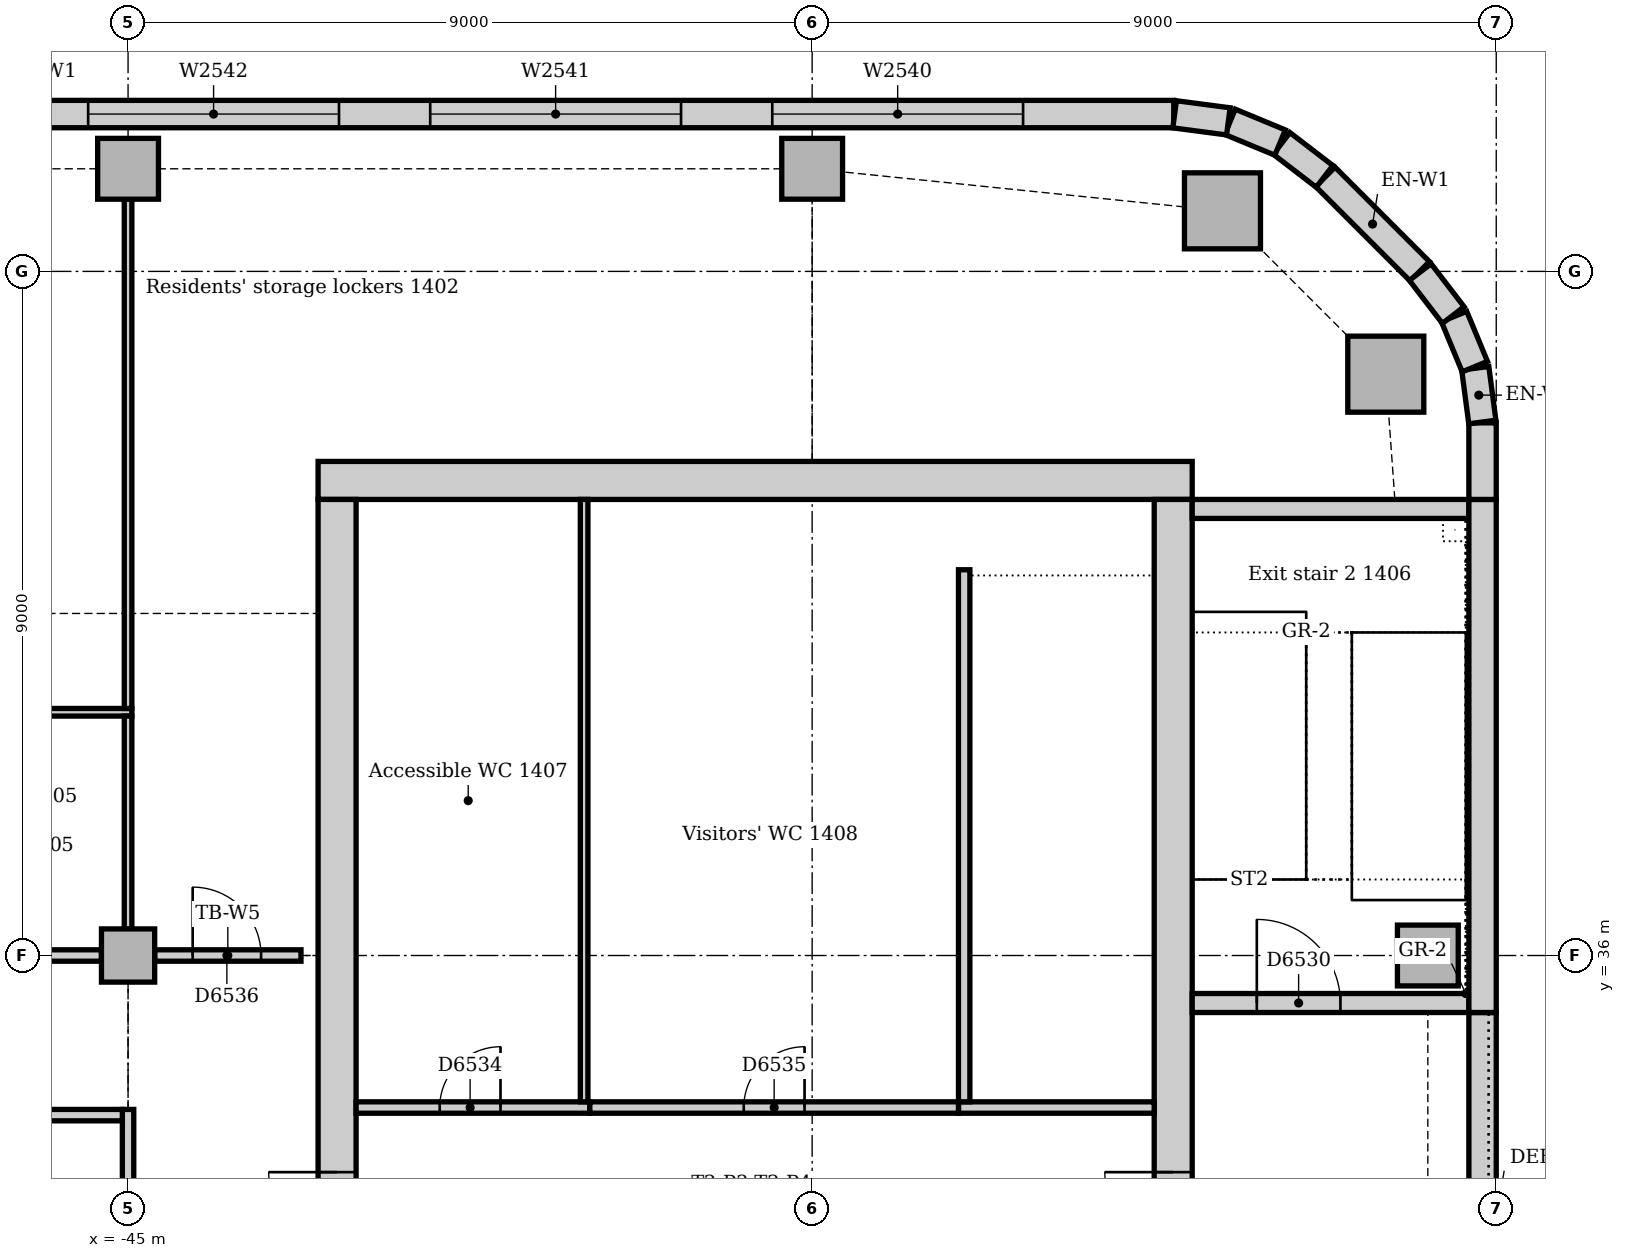
"""IFC4 building model, lengths in metres.
Left out: names, types, materials, properties, quantities, classifications, styles, units other than length and angle.
Written with IfcOpenShell. Run it as: python <this file> out.ifc"""

import sys

from ifc_helpers import new_model, si_unit, direction, frame, frame_2d, origin, origin_2d, place, context, subcontext, project, spatial, rectangle, extrude, element, fill, save


model = new_model("IFC4")
c1 = context("Model", 3, precision=1e-05, world=origin(), true_north=direction((0.0, 1.0)))
c2 = subcontext(c1, "Body", "Model", "MODEL_VIEW")
j1 = project(units=[si_unit("LENGTHUNIT", "METRE"), si_unit("PLANEANGLEUNIT", "RADIAN")], contexts=[c1])
p1 = place(None, origin())
s1 = spatial("IfcSite", under=j1, at=p1, CompositionType="ELEMENT")
p2 = place(p1, origin())
s2 = spatial("IfcBuilding", under=s1, at=p2, CompositionType="ELEMENT")
p3 = place(p2, frame((0.0, 0.0, 63.0)))
s3 = spatial("IfcBuildingStorey", under=s2, at=p3, CompositionType="ELEMENT", Elevation=63.0)
p4 = place(p3, frame((-31.0, 42.25, 0.0), z_axis=(0.0, 0.0, 1.0), x_axis=(-1.0, 0.0, 0.0)))
e1 = element("IfcWall", 1, at=p4, inside=s3, PredefinedType="SOLIDWALL", context=c2, shape_type="SweptSolid", body=[
    extrude(rectangle(XDim=11.5, YDim=0.5, at=frame_2d((5.75, 0.0))), origin(), (0.0, 0.0, 1.0), 4.0),
])
p5 = place(p3, frame((-31.25, 30.5, 0.0), z_axis=(0.0, 0.0, 1.0), x_axis=(0.0, 1.0, 0.0)))
e2 = element("IfcWall", 2, at=p5, inside=s3, PredefinedType="SOLIDWALL", context=c2, shape_type="SweptSolid", body=[
    extrude(rectangle(XDim=11.5, YDim=0.5, at=frame_2d((5.75, 0.0))), origin(), (0.0, 0.0, 1.0), 4.0),
])
p6 = place(p5, frame((0.85, 0.0, 0.0)))
e3 = element("IfcOpeningElement", 3, at=p6, cuts=e2, PredefinedType="OPENING", context=c2, shape_type="SweptSolid", body=[
    extrude(rectangle(XDim=1.8, YDim=2.1, at=frame_2d((0.9, 1.05))), frame((0.0, 0.26, 0.0), z_axis=(0.0, -1.0, 0.0), x_axis=(1.0, 0.0, 0.0)), (0.0, 0.0, 1.0), 0.52),
])
p7 = place(p3, frame((-42.25, 42.0, 0.0), z_axis=(0.0, 0.0, 1.0), x_axis=(0.0, -1.0, 0.0)))
e4 = element("IfcWall", 4, at=p7, inside=s3, PredefinedType="SOLIDWALL", context=c2, shape_type="SweptSolid", body=[
    extrude(rectangle(XDim=11.5, YDim=0.5, at=frame_2d((5.75, 0.0))), origin(), (0.0, 0.0, 1.0), 4.0),
])
p8 = place(p7, frame((8.85, 0.0, 0.0)))
e5 = element("IfcOpeningElement", 5, at=p8, cuts=e4, PredefinedType="OPENING", context=c2, shape_type="SweptSolid", body=[
    extrude(rectangle(XDim=1.8, YDim=2.1, at=frame_2d((0.9, 1.05))), frame((0.0, 0.26, 0.0), z_axis=(0.0, -1.0, 0.0), x_axis=(1.0, 0.0, 0.0)), (0.0, 0.0, 1.0), 0.52),
])
p9 = place(p3, frame((-31.0, 35.375, 0.0), z_axis=(0.0, 0.0, 1.0), x_axis=(1.0, 0.0, 0.0)))
e6 = element("IfcWall", 6, at=p9, inside=s3, PredefinedType="SOLIDWALL", context=c2, shape_type="SweptSolid", body=[
    extrude(rectangle(XDim=3.64, YDim=0.25, at=frame_2d((1.82, 0.0))), origin(), (0.0, 0.0, 1.0), 4.0),
])
p10 = place(p9, frame((0.85, 0.0, 0.0)))
e7 = element("IfcOpeningElement", 7, at=p10, cuts=e6, PredefinedType="OPENING", context=c2, shape_type="SweptSolid", body=[
    extrude(rectangle(XDim=1.1, YDim=2.1, at=frame_2d((0.55, 1.05))), frame((0.0, 0.135, 0.0), z_axis=(0.0, -1.0, 0.0), x_axis=(1.0, 0.0, 0.0)), (0.0, 0.0, 1.0), 0.27),
])
p11 = place(p3, frame((-27.36, 41.875, 0.0), z_axis=(0.0, 0.0, 1.0), x_axis=(-1.0, 0.0, 0.0)))
e8 = element("IfcWall", 8, at=p11, inside=s3, PredefinedType="SOLIDWALL", context=c2, shape_type="SweptSolid", body=[
    extrude(rectangle(XDim=3.64, YDim=0.25, at=frame_2d((1.82, 0.0))), origin(), (0.0, 0.0, 1.0), 4.0),
])
for number, where, z_axis, x_axis in (
    (9, (-28.453, 43.648, 0.0), (0.0, 0.0, 1.0), (1.0, 0.0, 0.0)),
    (10, (-30.602, 45.797, 0.0), (0.0, 0.0, 1.0), (1.0, 0.0, 0.0)),
):
    element("IfcColumn", number, at=place(p3, frame(where, z_axis=z_axis, x_axis=x_axis)), inside=s3, PredefinedType="COLUMN", context=c2, shape_type="SweptSolid", body=[
        extrude(rectangle(XDim=1.0, YDim=1.0, at=origin_2d()), origin(), (0.0, 0.0, 1.0), 3.85),
    ])
p12 = place(p3, frame((-27.9, 36.0, 0.0), z_axis=(0.0, 0.0, 1.0), x_axis=(1.0, 0.0, 0.0)))
e11 = element("IfcColumn", 11, at=p12, inside=s3, PredefinedType="COLUMN", context=c2, shape_type="SweptSolid", body=[
    extrude(rectangle(XDim=0.8, YDim=0.8, at=origin_2d()), origin(), (0.0, 0.0, 1.0), 4.0),
])
for number, where, z_axis, x_axis in (
    (12, (-45.0, 46.35, 0.0), (0.0, 0.0, 1.0), (1.0, 0.0, 0.0)),
    (13, (-36.0, 46.35, 0.0), (0.0, 0.0, 1.0), (1.0, 0.0, 0.0)),
):
    element("IfcColumn", number, at=place(p3, frame(where, z_axis=z_axis, x_axis=x_axis)), inside=s3, PredefinedType="COLUMN", context=c2, shape_type="SweptSolid", body=[
        extrude(rectangle(XDim=0.8, YDim=0.8, at=origin_2d()), origin(), (0.0, 0.0, 1.0), 3.85),
    ])
p13 = place(p3, frame((-45.0, 36.0, 0.0), z_axis=(0.0, 0.0, 1.0), x_axis=(1.0, 0.0, 0.0)))
e14 = element("IfcColumn", 14, at=p13, inside=s3, PredefinedType="COLUMN", context=c2, shape_type="SweptSolid", body=[
    extrude(rectangle(XDim=0.7, YDim=0.7, at=origin_2d()), origin(), (0.0, 0.0, 1.0), 3.85),
])
p14 = place(p3, frame((-27.18, 27.75, 0.0), z_axis=(0.0, 0.0, 1.0), x_axis=(0.0, 1.0, 0.0)))
e15 = element("IfcWall", 15, at=p14, inside=s3, PredefinedType="STANDARD", context=c2, shape_type="SweptSolid", body=[
    extrude(rectangle(XDim=7.5, YDim=0.36, at=frame_2d((3.75, 0.0))), origin(), (0.0, 0.0, 1.0), 3.85),
])
p15 = place(p14, frame((2.85, 0.0, 1.2)))
e16 = element("IfcOpeningElement", 16, at=p15, cuts=e15, PredefinedType="OPENING", context=c2, shape_type="SweptSolid", body=[
    extrude(rectangle(XDim=1.8, YDim=1.2, at=frame_2d((0.9, 0.6))), frame((0.0, 0.19, 0.0), z_axis=(0.0, -1.0, 0.0), x_axis=(1.0, 0.0, 0.0)), (0.0, 0.0, 1.0), 0.38),
])
p16 = place(p3, frame((-27.18, 35.25, 0.0), z_axis=(0.0, 0.0, 1.0), x_axis=(0.0, 1.0, 0.0)))
e17 = element("IfcWall", 17, at=p16, inside=s3, PredefinedType="STANDARD", context=c2, shape_type="SweptSolid", body=[
    extrude(rectangle(XDim=6.75, YDim=0.36, at=frame_2d((3.375, 0.0))), origin(), (0.0, 0.0, 1.0), 3.85),
])
p17 = place(p3, frame((-27.18, 42.0, 0.0), z_axis=(0.0, 0.0, 1.0), x_axis=(0.0, 1.0, 0.0)))
e18 = element("IfcWall", 18, at=p17, inside=s3, PredefinedType="STANDARD", context=c2, shape_type="SweptSolid", body=[
    extrude(rectangle(XDim=1.007, YDim=0.36, at=frame_2d((0.504, 0.0))), origin(), (0.0, 0.0, 1.0), 3.85),
])
p18 = place(p3, frame((-28.006, 45.001, 0.0), z_axis=(0.0, 0.0, 1.0), x_axis=(-0.707106781187, 0.707106781187, 0.0)))
e19 = element("IfcWall", 19, at=p18, inside=s3, PredefinedType="STANDARD", context=c2, shape_type="SweptSolid", body=[
    extrude(rectangle(XDim=1.757, YDim=0.36, at=frame_2d((0.879, 0.0))), origin(), (0.0, 0.0, 1.0), 3.85),
])
p19 = place(p3, frame((-31.243, 47.07, 0.0), z_axis=(0.0, 0.0, 1.0), x_axis=(-1.0, 0.0, 0.0)))
e20 = element("IfcWall", 20, at=p19, inside=s3, PredefinedType="STANDARD", context=c2, shape_type="SweptSolid", body=[
    extrude(rectangle(XDim=29.765, YDim=0.36, at=frame_2d((14.882, 0.0))), origin(), (0.0, 0.0, 1.0), 3.85),
])
p20 = place(p19, frame((1.982, 0.0, 0.9)))
e21 = element("IfcOpeningElement", 21, at=p20, cuts=e20, PredefinedType="OPENING", context=c2, shape_type="SweptSolid", body=[
    extrude(rectangle(XDim=3.3, YDim=1.6, at=frame_2d((1.65, 0.8))), frame((0.0, 0.19, 0.0), z_axis=(0.0, -1.0, 0.0), x_axis=(1.0, 0.0, 0.0)), (0.0, 0.0, 1.0), 0.38),
])
p21 = place(p19, frame((6.482, 0.0, 0.9)))
e22 = element("IfcOpeningElement", 22, at=p21, cuts=e20, PredefinedType="OPENING", context=c2, shape_type="SweptSolid", body=[
    extrude(rectangle(XDim=3.3, YDim=1.6, at=frame_2d((1.65, 0.8))), frame((0.0, 0.19, 0.0), z_axis=(0.0, -1.0, 0.0), x_axis=(1.0, 0.0, 0.0)), (0.0, 0.0, 1.0), 0.38),
])
p22 = place(p19, frame((10.982, 0.0, 0.9)))
e23 = element("IfcOpeningElement", 23, at=p22, cuts=e20, PredefinedType="OPENING", context=c2, shape_type="SweptSolid", body=[
    extrude(rectangle(XDim=3.3, YDim=1.6, at=frame_2d((1.65, 0.8))), frame((0.0, 0.19, 0.0), z_axis=(0.0, -1.0, 0.0), x_axis=(1.0, 0.0, 0.0)), (0.0, 0.0, 1.0), 0.38),
])
p23 = place(p19, frame((15.482, 0.0, 0.9)))
e24 = element("IfcOpeningElement", 24, at=p23, cuts=e20, PredefinedType="OPENING", context=c2, shape_type="SweptSolid", body=[
    extrude(rectangle(XDim=3.3, YDim=1.6, at=frame_2d((1.65, 0.8))), frame((0.0, 0.19, 0.0), z_axis=(0.0, -1.0, 0.0), x_axis=(1.0, 0.0, 0.0)), (0.0, 0.0, 1.0), 0.38),
])
p24 = place(p19, frame((19.982, 0.0, 0.9)))
e25 = element("IfcOpeningElement", 25, at=p24, cuts=e20, PredefinedType="OPENING", context=c2, shape_type="SweptSolid", body=[
    extrude(rectangle(XDim=3.3, YDim=1.6, at=frame_2d((1.65, 0.8))), frame((0.0, 0.19, 0.0), z_axis=(0.0, -1.0, 0.0), x_axis=(1.0, 0.0, 0.0)), (0.0, 0.0, 1.0), 0.38),
])
p25 = place(p19, frame((24.482, 0.0, 0.9)))
e26 = element("IfcOpeningElement", 26, at=p25, cuts=e20, PredefinedType="OPENING", context=c2, shape_type="SweptSolid", body=[
    extrude(rectangle(XDim=3.3, YDim=1.6, at=frame_2d((1.65, 0.8))), frame((0.0, 0.19, 0.0), z_axis=(0.0, -1.0, 0.0), x_axis=(1.0, 0.0, 0.0)), (0.0, 0.0, 1.0), 0.38),
])
for number, where, z_axis, x_axis in (
    (27, (-27.183, 43.019, 0.0), (0.0, 0.0, 1.0), (-0.131, 0.991, 0.0)),
    (28, (-27.282, 43.747, 0.0), (0.0, 0.0, 1.0), (-0.383, 0.924, 0.0)),
):
    element("IfcWall", number, at=place(p3, frame(where, z_axis=z_axis, x_axis=x_axis)), inside=s3, PredefinedType="STANDARD", context=c2, shape_type="SweptSolid", body=[
        extrude(rectangle(XDim=0.713, YDim=0.36, at=frame_2d((0.356, 0.0))), origin(), (0.0, 0.0, 1.0), 3.85),
    ])
for number, where, z_axis, x_axis in (
    (29, (-27.566, 44.425, 0.0), (0.0, 0.0, 1.0), (-0.609, 0.793, 0.0)),
    (30, (-29.259, 46.25, 0.0), (0.0, 0.0, 1.0), (-0.793, 0.609, 0.0)),
):
    element("IfcWall", number, at=place(p3, frame(where, z_axis=z_axis, x_axis=x_axis)), inside=s3, PredefinedType="STANDARD", context=c2, shape_type="SweptSolid", body=[
        extrude(rectangle(XDim=0.713, YDim=0.36, at=frame_2d((0.357, 0.0))), origin(), (0.0, 0.0, 1.0), 3.85),
    ])
for number, where, z_axis, x_axis in (
    (31, (-29.844, 46.695, 0.0), (0.0, 0.0, 1.0), (-0.924, 0.383, 0.0)),
    (32, (-30.524, 46.974, 0.0), (0.0, 0.0, 1.0), (-0.991, 0.131, 0.0)),
):
    element("IfcWall", number, at=place(p3, frame(where, z_axis=z_axis, x_axis=x_axis)), inside=s3, PredefinedType="STANDARD", context=c2, shape_type="SweptSolid", body=[
        extrude(rectangle(XDim=0.713, YDim=0.36, at=frame_2d((0.356, 0.0))), origin(), (0.0, 0.0, 1.0), 3.85),
    ])
p26 = place(p3, frame((-34.075, 34.0, 0.0), z_axis=(0.0, 0.0, 1.0), x_axis=(1.0, 0.0, 0.0)))
e33 = element("IfcWall", 33, at=p26, inside=s3, PredefinedType="SOLIDWALL", context=c2, shape_type="SweptSolid", body=[
    extrude(rectangle(XDim=2.575, YDim=0.15, at=frame_2d((1.288, 0.0))), origin(), (0.0, 0.0, 1.0), 4.0),
])
p27 = place(p3, frame((-34.0, 41.075, 0.0), z_axis=(0.0, 0.0, 1.0), x_axis=(0.0, -1.0, 0.0)))
e34 = element("IfcWall", 34, at=p27, inside=s3, PredefinedType="SOLIDWALL", context=c2, shape_type="SweptSolid", body=[
    extrude(rectangle(XDim=7.0, YDim=0.15, at=frame_2d((3.5, 0.0))), origin(), (0.0, 0.0, 1.0), 4.0),
])
p28 = place(p3, frame((-38.925, 34.0, 0.0), z_axis=(0.0, 0.0, 1.0), x_axis=(-1.0, 0.0, 0.0)))
e35 = element("IfcWall", 35, at=p28, inside=s3, PredefinedType="PARTITIONING", context=c2, shape_type="SweptSolid", body=[
    extrude(rectangle(XDim=3.075, YDim=0.15, at=frame_2d((1.538, 0.0))), origin(), (0.0, 0.0, 1.0), 3.85),
])
p29 = place(p28, frame((1.175, 0.0, 0.0)))
e36 = element("IfcOpeningElement", 36, at=p29, cuts=e35, PredefinedType="OPENING", context=c2, shape_type="SweptSolid", body=[
    extrude(rectangle(XDim=0.8, YDim=2.1, at=frame_2d((0.4, 1.05))), frame((0.0, 0.085, 0.0), z_axis=(0.0, -1.0, 0.0), x_axis=(1.0, 0.0, 0.0)), (0.0, 0.0, 1.0), 0.17),
])
p30 = place(p3, frame((-34.075, 34.0, 0.0), z_axis=(0.0, 0.0, 1.0), x_axis=(-1.0, 0.0, 0.0)))
e37 = element("IfcWall", 37, at=p30, inside=s3, PredefinedType="PARTITIONING", context=c2, shape_type="SweptSolid", body=[
    extrude(rectangle(XDim=4.85, YDim=0.15, at=frame_2d((2.425, 0.0))), origin(), (0.0, 0.0, 1.0), 3.85),
])
p31 = place(p30, frame((2.025, 0.0, 0.0)))
e38 = element("IfcOpeningElement", 38, at=p31, cuts=e37, PredefinedType="OPENING", context=c2, shape_type="SweptSolid", body=[
    extrude(rectangle(XDim=0.8, YDim=2.1, at=frame_2d((0.4, 1.05))), frame((0.0, 0.085, 0.0), z_axis=(0.0, -1.0, 0.0), x_axis=(1.0, 0.0, 0.0)), (0.0, 0.0, 1.0), 0.17),
])
p32 = place(p3, frame((-39.0, 34.075, 0.0), z_axis=(0.0, 0.0, 1.0), x_axis=(0.0, 1.0, 0.0)))
e39 = element("IfcWall", 39, at=p32, inside=s3, PredefinedType="PARTITIONING", context=c2, shape_type="SweptSolid", body=[
    extrude(rectangle(XDim=7.925, YDim=0.1, at=frame_2d((3.962, 0.0))), origin(), (0.0, 0.0, 1.0), 3.85),
])
p33 = place(p3, frame((-44.65, 36.0, 0.0), z_axis=(0.0, 0.0, 1.0), x_axis=(1.0, 0.0, 0.0)))
e40 = element("IfcWall", 40, at=p33, inside=s3, PredefinedType="PARTITIONING", context=c2, shape_type="SweptSolid", body=[
    extrude(rectangle(XDim=1.925, YDim=0.15, at=frame_2d((0.963, 0.0))), origin(), (0.0, 0.0, 1.0), 3.602),
])
p34 = place(p33, frame((0.5, 0.0, 0.0)))
e41 = element("IfcOpeningElement", 41, at=p34, cuts=e40, PredefinedType="OPENING", context=c2, shape_type="SweptSolid", body=[
    extrude(rectangle(XDim=0.9, YDim=2.1, at=frame_2d((0.45, 1.05))), frame((0.0, 0.085, 0.0), z_axis=(0.0, -1.0, 0.0), x_axis=(1.0, 0.0, 0.0)), (0.0, 0.0, 1.0), 0.17),
])
p35 = place(p3, frame((-53.65, 36.0, 0.0), z_axis=(0.0, 0.0, 1.0), x_axis=(1.0, 0.0, 0.0)))
e42 = element("IfcWall", 42, at=p35, inside=s3, PredefinedType="PARTITIONING", context=c2, shape_type="SweptSolid", body=[
    extrude(rectangle(XDim=8.3, YDim=0.15, at=frame_2d((4.15, 0.0))), origin(), (0.0, 0.0, 1.0), 3.158),
])
p36 = place(p35, frame((2.94, 0.0, 0.0)))
e43 = element("IfcOpeningElement", 43, at=p36, cuts=e42, PredefinedType="OPENING", context=c2, shape_type="SweptSolid", body=[
    extrude(rectangle(XDim=1.0, YDim=2.1, at=frame_2d((0.5, 1.05))), frame((0.0, 0.085, 0.0), z_axis=(0.0, -1.0, 0.0), x_axis=(1.0, 0.0, 0.0)), (0.0, 0.0, 1.0), 0.17),
])
p37 = place(p3, frame((-45.0, 27.35, 0.0), z_axis=(0.0, 0.0, 1.0), x_axis=(0.0, 1.0, 0.0)))
e44 = element("IfcWall", 44, at=p37, inside=s3, PredefinedType="PARTITIONING", context=c2, shape_type="SweptSolid", body=[
    extrude(rectangle(XDim=6.625, YDim=0.15, at=frame_2d((3.312, 0.0))), origin(), (0.0, 0.0, 1.0), 3.256),
])
p38 = place(p3, frame((-52.575, 33.9, 0.0), z_axis=(0.0, 0.0, 1.0), x_axis=(1.0, 0.0, 0.0)))
e45 = element("IfcWall", 45, at=p38, inside=s3, PredefinedType="PARTITIONING", context=c2, shape_type="SweptSolid", body=[
    extrude(rectangle(XDim=7.5, YDim=0.15, at=frame_2d((3.75, 0.0))), origin(), (0.0, 0.0, 1.0), 3.85),
])
p39 = place(p3, frame((-53.925, 39.2, 0.0), z_axis=(0.0, 0.0, 1.0), x_axis=(1.0, 0.0, 0.0)))
e46 = element("IfcWall", 46, at=p39, inside=s3, PredefinedType="PARTITIONING", context=c2, shape_type="SweptSolid", body=[
    extrude(rectangle(XDim=8.975, YDim=0.1, at=frame_2d((4.487, 0.0))), origin(), (0.0, 0.0, 1.0), 3.85),
])
p40 = place(p39, frame((3.265, 0.0, 0.0)))
e47 = element("IfcOpeningElement", 47, at=p40, cuts=e46, PredefinedType="OPENING", context=c2, shape_type="SweptSolid", body=[
    extrude(rectangle(XDim=0.9, YDim=2.1, at=frame_2d((0.45, 1.05))), frame((0.0, 0.06, 0.0), z_axis=(0.0, -1.0, 0.0), x_axis=(1.0, 0.0, 0.0)), (0.0, 0.0, 1.0), 0.12),
])
p41 = place(p3, frame((-45.0, 39.25, 0.0), z_axis=(0.0, 0.0, 1.0), x_axis=(0.0, 1.0, 0.0)))
e48 = element("IfcWall", 48, at=p41, inside=s3, PredefinedType="PARTITIONING", context=c2, shape_type="SweptSolid", body=[
    extrude(rectangle(XDim=6.7, YDim=0.1, at=frame_2d((3.35, 0.0))), origin(), (0.0, 0.0, 1.0), 3.256),
])
p42 = place(p3, frame((-45.0, 36.35, 0.0), z_axis=(0.0, 0.0, 1.0), x_axis=(0.0, 1.0, 0.0)))
e49 = element("IfcWall", 49, at=p42, inside=s3, PredefinedType="PARTITIONING", context=c2, shape_type="SweptSolid", body=[
    extrude(rectangle(XDim=2.8, YDim=0.1, at=frame_2d((1.4, 0.0))), origin(), (0.0, 0.0, 1.0), 3.256),
])
p43 = place(p20, origin())
e50 = element("IfcWindow", 50, at=p43, inside=s3, PartitioningType="SINGLE_PANEL", PredefinedType="WINDOW", context=c2, shape_type="SweptSolid", body=[
    extrude(rectangle(XDim=3.3, YDim=1.6, at=frame_2d((1.65, 0.8))), frame((0.0, 0.13, 0.0), z_axis=(0.0, -1.0, 0.0), x_axis=(1.0, 0.0, 0.0)), (0.0, 0.0, 1.0), 0.06),
])
fill(e21, e50)
p44 = place(p21, origin())
e51 = element("IfcWindow", 51, at=p44, inside=s3, PartitioningType="SINGLE_PANEL", PredefinedType="WINDOW", context=c2, shape_type="SweptSolid", body=[
    extrude(rectangle(XDim=3.3, YDim=1.6, at=frame_2d((1.65, 0.8))), frame((0.0, 0.13, 0.0), z_axis=(0.0, -1.0, 0.0), x_axis=(1.0, 0.0, 0.0)), (0.0, 0.0, 1.0), 0.06),
])
fill(e22, e51)
p45 = place(p22, origin())
e52 = element("IfcWindow", 52, at=p45, inside=s3, PartitioningType="SINGLE_PANEL", PredefinedType="WINDOW", context=c2, shape_type="SweptSolid", body=[
    extrude(rectangle(XDim=3.3, YDim=1.6, at=frame_2d((1.65, 0.8))), frame((0.0, 0.13, 0.0), z_axis=(0.0, -1.0, 0.0), x_axis=(1.0, 0.0, 0.0)), (0.0, 0.0, 1.0), 0.06),
])
fill(e23, e52)
p46 = place(p10, origin())
e53 = element("IfcDoor", 53, at=p46, inside=s3, OperationType="SINGLE_SWING_LEFT", PredefinedType="DOOR", context=c2, shape_type="SweptSolid", body=[
    extrude(rectangle(XDim=1.1, YDim=2.1, at=frame_2d((0.55, 1.05))), frame((0.0, 0.025, 0.0), z_axis=(0.0, -1.0, 0.0), x_axis=(1.0, 0.0, 0.0)), (0.0, 0.0, 1.0), 0.05),
])
fill(e7, e53)
p47 = place(p6, origin())
e54 = element("IfcDoor", 54, at=p47, inside=s3, OperationType="DOUBLE_DOOR_SINGLE_SWING", PredefinedType="DOOR", context=c2, shape_type="SweptSolid", body=[
    extrude(rectangle(XDim=1.8, YDim=2.1, at=frame_2d((0.9, 1.05))), frame((0.0, 0.025, 0.0), z_axis=(0.0, -1.0, 0.0), x_axis=(1.0, 0.0, 0.0)), (0.0, 0.0, 1.0), 0.05),
])
fill(e3, e54)
p48 = place(p8, frame((1.8, 0.0, 0.0), z_axis=(0.0, 0.0, 1.0), x_axis=(-1.0, 0.0, 0.0)))
e55 = element("IfcDoor", 55, at=p48, inside=s3, OperationType="DOUBLE_DOOR_SINGLE_SWING", PredefinedType="DOOR", context=c2, shape_type="SweptSolid", body=[
    extrude(rectangle(XDim=1.8, YDim=2.1, at=frame_2d((0.9, 1.05))), frame((0.0, 0.025, 0.0), z_axis=(0.0, -1.0, 0.0), x_axis=(1.0, 0.0, 0.0)), (0.0, 0.0, 1.0), 0.05),
])
fill(e5, e55)
p49 = place(p29, frame((0.8, 0.0, 0.0), z_axis=(0.0, 0.0, 1.0), x_axis=(-1.0, 0.0, 0.0)))
e56 = element("IfcDoor", 56, at=p49, inside=s3, OperationType="SINGLE_SWING_RIGHT", PredefinedType="DOOR", context=c2, shape_type="SweptSolid", body=[
    extrude(rectangle(XDim=0.8, YDim=2.1, at=frame_2d((0.4, 1.05))), frame((0.0, 0.025, 0.0), z_axis=(0.0, -1.0, 0.0), x_axis=(1.0, 0.0, 0.0)), (0.0, 0.0, 1.0), 0.05),
])
fill(e36, e56)
p50 = place(p31, frame((0.8, 0.0, 0.0), z_axis=(0.0, 0.0, 1.0), x_axis=(-1.0, 0.0, 0.0)))
e57 = element("IfcDoor", 57, at=p50, inside=s3, OperationType="SINGLE_SWING_RIGHT", PredefinedType="DOOR", context=c2, shape_type="SweptSolid", body=[
    extrude(rectangle(XDim=0.8, YDim=2.1, at=frame_2d((0.4, 1.05))), frame((0.0, 0.025, 0.0), z_axis=(0.0, -1.0, 0.0), x_axis=(1.0, 0.0, 0.0)), (0.0, 0.0, 1.0), 0.05),
])
fill(e38, e57)
p51 = place(p34, origin())
e58 = element("IfcDoor", 58, at=p51, inside=s3, OperationType="SINGLE_SWING_LEFT", PredefinedType="DOOR", context=c2, shape_type="SweptSolid", body=[
    extrude(rectangle(XDim=0.9, YDim=2.1, at=frame_2d((0.45, 1.05))), frame((0.0, 0.025, 0.0), z_axis=(0.0, -1.0, 0.0), x_axis=(1.0, 0.0, 0.0)), (0.0, 0.0, 1.0), 0.05),
])
fill(e41, e58)
save(model, sys.argv[1])
